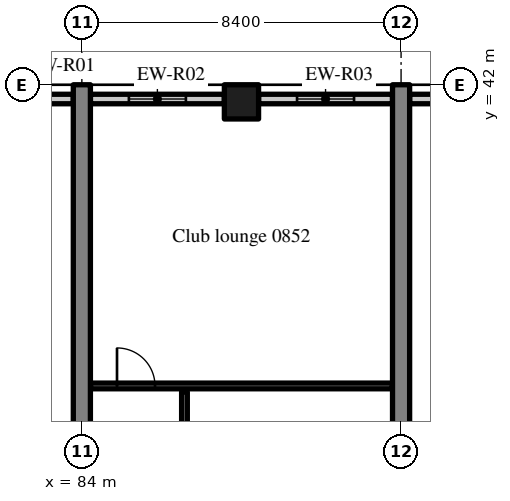
"""IFC4 building model, lengths in metres.
Left out: names, types, materials, properties, quantities, classifications, styles, units other than length and angle.
Written with IfcOpenShell. Run it as: python <this file> out.ifc"""

import sys

from ifc_helpers import new_model, si_unit, direction, frame, frame_2d, origin, origin_2d, place, context, subcontext, project, spatial, rectangle, extrude, source, transform, mapped, element, fill, save


model = new_model("IFC4")
c1 = context("Model", 3, precision=1e-05, world=origin(), true_north=direction((0.0, 1.0)))
c2 = subcontext(c1, "Body", "Model", "MODEL_VIEW")
j1 = project(units=[si_unit("LENGTHUNIT", "METRE"), si_unit("PLANEANGLEUNIT", "RADIAN")], contexts=[c1])
p1 = place(None, origin())
s1 = spatial("IfcSite", under=j1, at=p1, CompositionType="ELEMENT")
p2 = place(p1, origin())
s2 = spatial("IfcBuilding", under=s1, at=p2, CompositionType="ELEMENT")
p3 = place(p2, frame((0.0, 0.0, 39.2)))
s3 = spatial("IfcBuildingStorey", under=s2, at=p3, CompositionType="ELEMENT", Elevation=39.2)
m1 = source(origin(), c2, "Body", "SweptSolid", [
    extrude(rectangle(XDim=20.0, YDim=0.45, at=frame_2d((10.0, 0.0))), origin(), (0.0, 0.0, 1.0), 3.52),
])
for number, where, z_axis, x_axis in (
    (1, (84.0, 22.0, 0.0), (0.0, 0.0, 1.0), (0.0, 1.0, 0.0)),
    (2, (92.4, 22.0, 0.0), (0.0, 0.0, 1.0), (0.0, 1.0, 0.0)),
):
    element("IfcWall", number, at=place(p3, frame(where, z_axis=z_axis, x_axis=x_axis)), inside=s3, PredefinedType="SHEAR", context=c2, shape_type="MappedRepresentation", body=[
        mapped(m1, transform((0.0, 0.0, 0.0), scale=1.0)),
    ])
m2 = source(origin(), c2, "Body", "SweptSolid", [
    extrude(rectangle(XDim=0.9, YDim=0.9, at=origin_2d()), origin(), (0.0, 0.0, 1.0), 3.52),
])
p4 = place(p3, frame((88.2, 41.55, 0.0), z_axis=(0.0, 0.0, 1.0), x_axis=(1.0, 0.0, 0.0)))
e3 = element("IfcColumn", 3, at=p4, inside=s3, PredefinedType="COLUMN", context=c2, shape_type="MappedRepresentation", body=[
    mapped(m2, transform((0.0, 0.0, 0.0), scale=1.0)),
])
m3 = source(origin(), c2, "Body", "SweptSolid", [
    extrude(rectangle(XDim=1.633, YDim=0.25, at=frame_2d((0.816, 0.0))), origin(), (0.0, 0.0, 1.0), 2.77),
])
p5 = place(p3, frame((83.775, 41.625, 0.0), z_axis=(0.0, 0.0, 1.0), x_axis=(-1.0, 0.0, 0.0)))
e4 = element("IfcWall", 4, at=p5, inside=s3, PredefinedType="SOLIDWALL", context=c2, shape_type="MappedRepresentation", body=[
    mapped(m3, transform((0.0, 0.0, 0.0), scale=1.0)),
])
m4 = source(origin(), c2, "Body", "SweptSolid", [
    extrude(rectangle(XDim=3.525, YDim=0.25, at=frame_2d((1.762, 0.0))), origin(), (0.0, 0.0, 1.0), 2.77),
])
p6 = place(p3, frame((87.75, 41.625, 0.0), z_axis=(0.0, 0.0, 1.0), x_axis=(-1.0, 0.0, 0.0)))
e5 = element("IfcWall", 5, at=p6, inside=s3, PredefinedType="SOLIDWALL", context=c2, shape_type="MappedRepresentation", body=[
    mapped(m4, transform((0.0, 0.0, 0.0), scale=1.0)),
])
m5 = source(origin(), c2, "Body", "SweptSolid", [
    extrude(rectangle(XDim=1.5, YDim=1.5, at=frame_2d((0.75, 0.75))), frame((0.0, 0.135, 0.0), z_axis=(0.0, -1.0, 0.0), x_axis=(1.0, 0.0, 0.0)), (0.0, 0.0, 1.0), 0.27),
])
p7 = place(p6, frame((1.012, 0.0, 0.9)))
e6 = element("IfcOpeningElement", 6, at=p7, cuts=e5, PredefinedType="OPENING", context=c2, shape_type="MappedRepresentation", body=[
    mapped(m5, transform((0.0, 0.0, 0.0), scale=1.0)),
])
m6 = source(origin(), c2, "Body", "SweptSolid", [
    extrude(rectangle(XDim=3.525, YDim=0.25, at=frame_2d((1.763, 0.0))), origin(), (0.0, 0.0, 1.0), 2.77),
])
p8 = place(p3, frame((92.175, 41.625, 0.0), z_axis=(0.0, 0.0, 1.0), x_axis=(-1.0, 0.0, 0.0)))
e7 = element("IfcWall", 7, at=p8, inside=s3, PredefinedType="SOLIDWALL", context=c2, shape_type="MappedRepresentation", body=[
    mapped(m6, transform((0.0, 0.0, 0.0), scale=1.0)),
])
p9 = place(p8, frame((1.012, 0.0, 0.9)))
e8 = element("IfcOpeningElement", 8, at=p9, cuts=e7, PredefinedType="OPENING", context=c2, shape_type="MappedRepresentation", body=[
    mapped(m5, transform((0.0, 0.0, 0.0), scale=1.0)),
])
m7 = source(origin(), c2, "Body", "SweptSolid", [
    extrude(rectangle(XDim=4.02, YDim=0.25, at=frame_2d((2.01, 0.0))), origin(), (0.0, 0.0, 1.0), 2.77),
])
p10 = place(p3, frame((96.645, 41.625, 0.0), z_axis=(0.0, 0.0, 1.0), x_axis=(-1.0, 0.0, 0.0)))
e9 = element("IfcWall", 9, at=p10, inside=s3, PredefinedType="SOLIDWALL", context=c2, shape_type="MappedRepresentation", body=[
    mapped(m7, transform((0.0, 0.0, 0.0), scale=1.0)),
])
p11 = place(p10, frame((1.26, 0.0, 0.9)))
e10 = element("IfcOpeningElement", 10, at=p11, cuts=e9, PredefinedType="OPENING", context=c2, shape_type="MappedRepresentation", body=[
    mapped(m5, transform((0.0, 0.0, 0.0), scale=1.0)),
])
m8 = source(origin(), c2, "Body", "SweptSolid", [
    extrude(rectangle(XDim=4.45, YDim=0.15, at=frame_2d((2.225, 0.0))), origin(), (0.0, 0.0, 1.0), 3.52),
])
p12 = place(p3, frame((86.7, 29.475, 0.0), z_axis=(0.0, 0.0, 1.0), x_axis=(0.0, 1.0, 0.0)))
e11 = element("IfcWall", 11, at=p12, inside=s3, PredefinedType="PARTITIONING", context=c2, shape_type="MappedRepresentation", body=[
    mapped(m8, transform((0.0, 0.0, 0.0), scale=1.0)),
])
m9 = source(origin(), c2, "Body", "SweptSolid", [
    extrude(rectangle(XDim=1.0, YDim=2.1, at=frame_2d((0.5, 1.05))), frame((0.0, 0.085, 0.0), z_axis=(0.0, -1.0, 0.0), x_axis=(1.0, 0.0, 0.0)), (0.0, 0.0, 1.0), 0.17),
])
p13 = place(p12, frame((1.725, 0.0, 0.0)))
e12 = element("IfcOpeningElement", 12, at=p13, cuts=e11, PredefinedType="OPENING", context=c2, shape_type="MappedRepresentation", body=[
    mapped(m9, transform((0.0, 0.0, 0.0), scale=1.0)),
])
m10 = source(origin(), c2, "Body", "SweptSolid", [
    extrude(rectangle(XDim=7.95, YDim=0.15, at=frame_2d((3.975, 0.0))), origin(), (0.0, 0.0, 1.0), 3.52),
])
p14 = place(p3, frame((84.225, 34.075, 0.0), z_axis=(0.0, 0.0, 1.0), x_axis=(1.0, 0.0, 0.0)))
e13 = element("IfcWall", 13, at=p14, inside=s3, PredefinedType="PARTITIONING", context=c2, shape_type="MappedRepresentation", body=[
    mapped(m10, transform((0.0, 0.0, 0.0), scale=1.0)),
])
p15 = place(p14, frame((0.7, 0.0, 0.0)))
e14 = element("IfcOpeningElement", 14, at=p15, cuts=e13, PredefinedType="OPENING", context=c2, shape_type="MappedRepresentation", body=[
    mapped(m9, transform((0.0, 0.0, 0.0), scale=1.0)),
])
m11 = source(origin(), c2, "Body", "SweptSolid", [
    extrude(rectangle(XDim=1.5, YDim=1.5, at=frame_2d((0.75, 0.75))), frame((0.0, 0.03, 0.0), z_axis=(0.0, -1.0, 0.0), x_axis=(1.0, 0.0, 0.0)), (0.0, 0.0, 1.0), 0.06),
])
p16 = place(p7, origin())
e15 = element("IfcWindow", 15, at=p16, inside=s3, PartitioningType="SINGLE_PANEL", PredefinedType="WINDOW", context=c2, shape_type="MappedRepresentation", body=[
    mapped(m11, transform((0.0, 0.0, 0.0), scale=1.0)),
])
fill(e6, e15)
p17 = place(p9, origin())
e16 = element("IfcWindow", 16, at=p17, inside=s3, PartitioningType="SINGLE_PANEL", PredefinedType="WINDOW", context=c2, shape_type="MappedRepresentation", body=[
    mapped(m11, transform((0.0, 0.0, 0.0), scale=1.0)),
])
fill(e8, e16)
m12 = source(origin(), c2, "Body", "SweptSolid", [
    extrude(rectangle(XDim=1.0, YDim=2.1, at=frame_2d((0.5, 1.05))), frame((0.0, 0.025, 0.0), z_axis=(0.0, -1.0, 0.0), x_axis=(1.0, 0.0, 0.0)), (0.0, 0.0, 1.0), 0.05),
])
p18 = place(p15, origin())
e17 = element("IfcDoor", 17, at=p18, inside=s3, OperationType="SINGLE_SWING_LEFT", PredefinedType="DOOR", context=c2, shape_type="MappedRepresentation", body=[
    mapped(m12, transform((0.0, 0.0, 0.0), scale=1.0)),
])
fill(e14, e17)
save(model, sys.argv[1])
